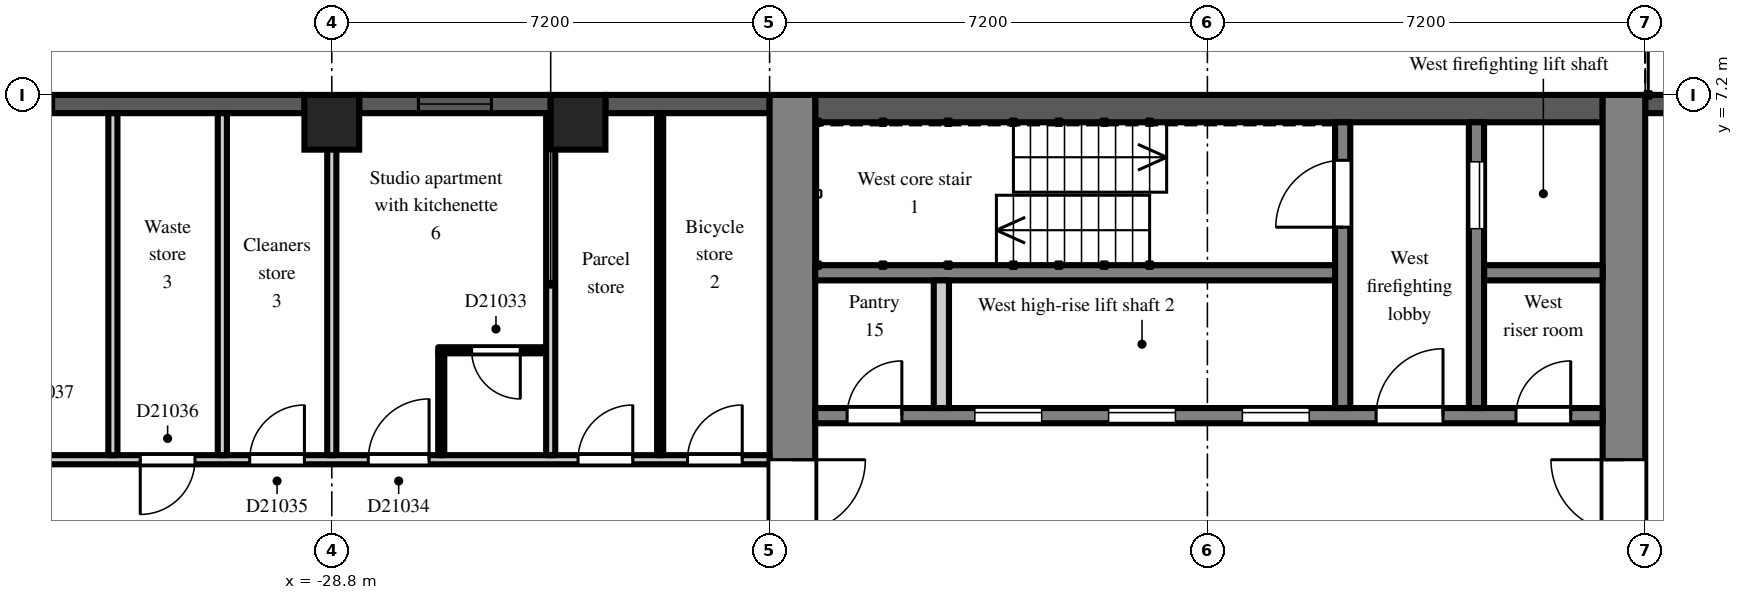
"""IFC4 building model, lengths in metres.
Left out: names, types, materials, properties, quantities, classifications, styles, units other than length and angle.
Written with IfcOpenShell. Run it as: python <this file> out.ifc"""

import sys

from ifc_helpers import new_model, si_unit, direction, frame, frame_2d, origin, origin_2d, place, context, subcontext, project, spatial, rectangle, extrude, element, fill, save


model = new_model("IFC4")
c1 = context("Model", 3, precision=1e-05, world=origin(), true_north=direction((0.0, 1.0)))
c2 = subcontext(c1, "Body", "Model", "MODEL_VIEW")
j1 = project(units=[si_unit("LENGTHUNIT", "METRE"), si_unit("PLANEANGLEUNIT", "RADIAN")], contexts=[c1])
p1 = place(None, origin())
s1 = spatial("IfcSite", under=j1, at=p1, CompositionType="ELEMENT")
p2 = place(p1, origin())
s2 = spatial("IfcBuilding", under=s1, at=p2, CompositionType="ELEMENT")
p3 = place(p2, frame((0.0, 0.0, 147.3)))
s3 = spatial("IfcBuildingStorey", under=s2, at=p3, CompositionType="ELEMENT", Elevation=147.3)
for number, where, z_axis, x_axis in (
    (1, (-28.8, 6.75, 0.0), (0.0, 0.0, 1.0), (1.0, 0.0, 0.0)),
    (2, (-24.75, 6.75, 0.0), (0.0, 0.0, 1.0), (1.0, 0.0, 0.0)),
):
    element("IfcColumn", number, at=place(p3, frame(where, z_axis=z_axis, x_axis=x_axis)), inside=s3, PredefinedType="COLUMN", context=c2, shape_type="SweptSolid", body=[
        extrude(rectangle(XDim=0.9, YDim=0.9, at=origin_2d()), origin(), (0.0, 0.0, 1.0), 3.0),
    ])
p4 = place(p3, frame((-4.2, 7.05, 0.0), z_axis=(0.0, 0.0, 1.0), x_axis=(-1.0, 0.0, 0.0)))
e3 = element("IfcWall", 3, at=p4, inside=s3, PredefinedType="SOLIDWALL", context=c2, shape_type="SweptSolid", body=[
    extrude(rectangle(XDim=3.0, YDim=0.3, at=frame_2d((1.5, 0.0))), origin(), (0.0, 0.0, 1.0), 2.2),
])
p5 = place(p3, frame((-21.6, 7.05, 0.0), z_axis=(0.0, 0.0, 1.0), x_axis=(-1.0, 0.0, 0.0)))
e4 = element("IfcWall", 4, at=p5, inside=s3, PredefinedType="SOLIDWALL", context=c2, shape_type="SweptSolid", body=[
    extrude(rectangle(XDim=2.7, YDim=0.3, at=frame_2d((1.35, 0.0))), origin(), (0.0, 0.0, 1.0), 2.2),
])
p6 = place(p3, frame((-25.2, 7.05, 0.0), z_axis=(0.0, 0.0, 1.0), x_axis=(-1.0, 0.0, 0.0)))
e5 = element("IfcWall", 5, at=p6, inside=s3, PredefinedType="SOLIDWALL", context=c2, shape_type="SweptSolid", body=[
    extrude(rectangle(XDim=3.15, YDim=0.3, at=frame_2d((1.575, 0.0))), origin(), (0.0, 0.0, 1.0), 2.2),
])
p7 = place(p6, frame((0.975, 0.0, 0.2)))
e6 = element("IfcOpeningElement", 6, at=p7, cuts=e5, PredefinedType="OPENING", context=c2, shape_type="SweptSolid", body=[
    extrude(rectangle(XDim=1.2, YDim=1.85, at=frame_2d((0.6, 0.925))), frame((0.0, 0.16, 0.0), z_axis=(0.0, -1.0, 0.0), x_axis=(1.0, 0.0, 0.0)), (0.0, 0.0, 1.0), 0.32),
])
p8 = place(p3, frame((-29.25, 7.05, 0.0), z_axis=(0.0, 0.0, 1.0), x_axis=(-1.0, 0.0, 0.0)))
e7 = element("IfcWall", 7, at=p8, inside=s3, PredefinedType="SOLIDWALL", context=c2, shape_type="SweptSolid", body=[
    extrude(rectangle(XDim=6.3, YDim=0.3, at=frame_2d((3.15, 0.0))), origin(), (0.0, 0.0, 1.0), 2.2),
])
p9 = place(p8, frame((4.125, 0.0, 0.2)))
e8 = element("IfcOpeningElement", 8, at=p9, cuts=e7, PredefinedType="OPENING", context=c2, shape_type="SweptSolid", body=[
    extrude(rectangle(XDim=1.2, YDim=1.85, at=frame_2d((0.6, 0.925))), frame((0.0, 0.16, 0.0), z_axis=(0.0, -1.0, 0.0), x_axis=(1.0, 0.0, 0.0)), (0.0, 0.0, 1.0), 0.32),
])
p10 = place(p3, frame((-7.55, -7.2, 0.0), z_axis=(0.0, 0.0, 1.0), x_axis=(0.0, 1.0, 0.0)))
e9 = element("IfcWall", 9, at=p10, inside=s3, PredefinedType="SHEAR", context=c2, shape_type="SweptSolid", body=[
    extrude(rectangle(XDim=14.4, YDim=0.7, at=frame_2d((7.2, 0.0))), origin(), (0.0, 0.0, 1.0), 2.6),
])
p11 = place(p10, frame((6.0, 0.0, 0.0)))
e10 = element("IfcOpeningElement", 10, at=p11, cuts=e9, PredefinedType="OPENING", context=c2, shape_type="SweptSolid", body=[
    extrude(rectangle(XDim=2.4, YDim=2.2, at=frame_2d((1.2, 1.1))), frame((0.0, 0.36, 0.0), z_axis=(0.0, -1.0, 0.0), x_axis=(1.0, 0.0, 0.0)), (0.0, 0.0, 1.0), 0.72),
])
p12 = place(p3, frame((-21.225, -7.2, 0.0), z_axis=(0.0, 0.0, 1.0), x_axis=(0.0, 1.0, 0.0)))
e11 = element("IfcWall", 11, at=p12, inside=s3, PredefinedType="SHEAR", context=c2, shape_type="SweptSolid", body=[
    extrude(rectangle(XDim=14.4, YDim=0.75, at=frame_2d((7.2, 0.0))), origin(), (0.0, 0.0, 1.0), 2.6),
])
p13 = place(p12, frame((6.0, 0.0, 0.0)))
e12 = element("IfcOpeningElement", 12, at=p13, cuts=e11, PredefinedType="OPENING", context=c2, shape_type="SweptSolid", body=[
    extrude(rectangle(XDim=2.4, YDim=2.2, at=frame_2d((1.2, 1.1))), frame((0.0, 0.385, 0.0), z_axis=(0.0, -1.0, 0.0), x_axis=(1.0, 0.0, 0.0)), (0.0, 0.0, 1.0), 0.77),
])
p14 = place(p3, frame((-7.9, 6.975, 0.0), z_axis=(0.0, 0.0, 1.0), x_axis=(-1.0, 0.0, 0.0)))
e13 = element("IfcWall", 13, at=p14, inside=s3, PredefinedType="SHEAR", context=c2, shape_type="SweptSolid", body=[
    extrude(rectangle(XDim=12.95, YDim=0.45, at=frame_2d((6.475, 0.0))), origin(), (0.0, 0.0, 1.0), 2.6),
])
p15 = place(p3, frame((-7.9, 1.925, 0.0), z_axis=(0.0, 0.0, 1.0), x_axis=(-1.0, 0.0, 0.0)))
e14 = element("IfcWall", 14, at=p15, inside=s3, PredefinedType="SHEAR", context=c2, shape_type="SweptSolid", body=[
    extrude(rectangle(XDim=12.95, YDim=0.25, at=frame_2d((6.475, 0.0))), origin(), (0.0, 0.0, 1.0), 2.6),
])
p16 = place(p15, frame((4.825, 0.0, 0.0)))
e15 = element("IfcOpeningElement", 15, at=p16, cuts=e14, PredefinedType="OPENING", context=c2, shape_type="SweptSolid", body=[
    extrude(rectangle(XDim=1.1, YDim=2.1, at=frame_2d((0.55, 1.05))), frame((0.0, 0.135, 0.0), z_axis=(0.0, -1.0, 0.0), x_axis=(1.0, 0.0, 0.0)), (0.0, 0.0, 1.0), 0.27),
])
p17 = place(p15, frame((7.025, 0.0, 0.0)))
e16 = element("IfcOpeningElement", 16, at=p17, cuts=e14, PredefinedType="OPENING", context=c2, shape_type="SweptSolid", body=[
    extrude(rectangle(XDim=1.1, YDim=2.1, at=frame_2d((0.55, 1.05))), frame((0.0, 0.135, 0.0), z_axis=(0.0, -1.0, 0.0), x_axis=(1.0, 0.0, 0.0)), (0.0, 0.0, 1.0), 0.27),
])
p18 = place(p15, frame((9.225, 0.0, 0.0)))
e17 = element("IfcOpeningElement", 17, at=p18, cuts=e14, PredefinedType="OPENING", context=c2, shape_type="SweptSolid", body=[
    extrude(rectangle(XDim=1.1, YDim=2.1, at=frame_2d((0.55, 1.05))), frame((0.0, 0.135, 0.0), z_axis=(0.0, -1.0, 0.0), x_axis=(1.0, 0.0, 0.0)), (0.0, 0.0, 1.0), 0.27),
])
p19 = place(p15, frame((0.525, 0.0, 0.0)))
e18 = element("IfcOpeningElement", 18, at=p19, cuts=e14, PredefinedType="OPENING", context=c2, shape_type="SweptSolid", body=[
    extrude(rectangle(XDim=0.9, YDim=2.1, at=frame_2d((0.45, 1.05))), frame((0.0, 0.135, 0.0), z_axis=(0.0, -1.0, 0.0), x_axis=(1.0, 0.0, 0.0)), (0.0, 0.0, 1.0), 0.27),
])
p20 = place(p15, frame((2.625, 0.0, 0.0)))
e19 = element("IfcOpeningElement", 19, at=p20, cuts=e14, PredefinedType="OPENING", context=c2, shape_type="SweptSolid", body=[
    extrude(rectangle(XDim=1.1, YDim=2.1, at=frame_2d((0.55, 1.05))), frame((0.0, 0.135, 0.0), z_axis=(0.0, -1.0, 0.0), x_axis=(1.0, 0.0, 0.0)), (0.0, 0.0, 1.0), 0.27),
])
p21 = place(p15, frame((11.525, 0.0, 0.0)))
e20 = element("IfcOpeningElement", 20, at=p21, cuts=e14, PredefinedType="OPENING", context=c2, shape_type="SweptSolid", body=[
    extrude(rectangle(XDim=0.9, YDim=2.1, at=frame_2d((0.45, 1.05))), frame((0.0, 0.135, 0.0), z_axis=(0.0, -1.0, 0.0), x_axis=(1.0, 0.0, 0.0)), (0.0, 0.0, 1.0), 0.27),
])
p22 = place(p3, frame((-7.9, 4.275, 0.0), z_axis=(0.0, 0.0, 1.0), x_axis=(-1.0, 0.0, 0.0)))
e21 = element("IfcWall", 21, at=p22, inside=s3, PredefinedType="SHEAR", context=c2, shape_type="SweptSolid", body=[
    extrude(rectangle(XDim=1.95, YDim=0.25, at=frame_2d((0.975, 0.0))), origin(), (0.0, 0.0, 1.0), 2.6),
])
p23 = place(p3, frame((-12.3, 4.275, 0.0), z_axis=(0.0, 0.0, 1.0), x_axis=(-1.0, 0.0, 0.0)))
e22 = element("IfcWall", 22, at=p23, inside=s3, PredefinedType="SHEAR", context=c2, shape_type="SweptSolid", body=[
    extrude(rectangle(XDim=8.55, YDim=0.25, at=frame_2d((4.275, 0.0))), origin(), (0.0, 0.0, 1.0), 2.6),
])
p24 = place(p3, frame((-9.975, 2.05, 0.0), z_axis=(0.0, 0.0, 1.0), x_axis=(0.0, 1.0, 0.0)))
e23 = element("IfcWall", 23, at=p24, inside=s3, PredefinedType="SHEAR", context=c2, shape_type="SweptSolid", body=[
    extrude(rectangle(XDim=4.7, YDim=0.25, at=frame_2d((2.35, 0.0))), origin(), (0.0, 0.0, 1.0), 2.6),
])
p25 = place(p24, frame((2.95, 0.0, 0.0)))
e24 = element("IfcOpeningElement", 24, at=p25, cuts=e23, PredefinedType="OPENING", context=c2, shape_type="SweptSolid", body=[
    extrude(rectangle(XDim=1.1, YDim=2.1, at=frame_2d((0.55, 1.05))), frame((0.0, 0.135, 0.0), z_axis=(0.0, -1.0, 0.0), x_axis=(1.0, 0.0, 0.0)), (0.0, 0.0, 1.0), 0.27),
])
p26 = place(p3, frame((-12.175, 2.05, 0.0), z_axis=(0.0, 0.0, 1.0), x_axis=(0.0, 1.0, 0.0)))
e25 = element("IfcWall", 25, at=p26, inside=s3, PredefinedType="SHEAR", context=c2, shape_type="SweptSolid", body=[
    extrude(rectangle(XDim=4.7, YDim=0.25, at=frame_2d((2.35, 0.0))), origin(), (0.0, 0.0, 1.0), 2.6),
])
p27 = place(p26, frame((2.975, 0.0, 0.0)))
e26 = element("IfcOpeningElement", 26, at=p27, cuts=e25, PredefinedType="OPENING", context=c2, shape_type="SweptSolid", body=[
    extrude(rectangle(XDim=1.1, YDim=2.1, at=frame_2d((0.55, 1.05))), frame((0.0, 0.135, 0.0), z_axis=(0.0, -1.0, 0.0), x_axis=(1.0, 0.0, 0.0)), (0.0, 0.0, 1.0), 0.27),
])
p28 = place(p3, frame((-18.775, 2.05, 0.0), z_axis=(0.0, 0.0, 1.0), x_axis=(0.0, 1.0, 0.0)))
e27 = element("IfcWall", 27, at=p28, inside=s3, PredefinedType="PARTITIONING", context=c2, shape_type="SweptSolid", body=[
    extrude(rectangle(XDim=2.1, YDim=0.25, at=frame_2d((1.05, 0.0))), origin(), (0.0, 0.0, 1.0), 2.6),
])
p29 = place(p3, frame((-36.5, 1.2, 0.0), z_axis=(0.0, 0.0, 1.0), x_axis=(1.0, 0.0, 0.0)))
e28 = element("IfcWall", 28, at=p29, inside=s3, PredefinedType="PARTITIONING", context=c2, shape_type="SweptSolid", body=[
    extrude(rectangle(XDim=14.9, YDim=0.15, at=frame_2d((7.45, 0.0))), origin(), (0.0, 0.0, 1.0), 2.6),
])
p30 = place(p29, frame((13.55, 0.0, 0.0)))
e29 = element("IfcOpeningElement", 29, at=p30, cuts=e28, PredefinedType="OPENING", context=c2, shape_type="SweptSolid", body=[
    extrude(rectangle(XDim=0.9, YDim=2.1, at=frame_2d((0.45, 1.05))), frame((0.0, 0.085, 0.0), z_axis=(0.0, -1.0, 0.0), x_axis=(1.0, 0.0, 0.0)), (0.0, 0.0, 1.0), 0.17),
])
p31 = place(p29, frame((11.75, 0.0, 0.0)))
e30 = element("IfcOpeningElement", 30, at=p31, cuts=e28, PredefinedType="OPENING", context=c2, shape_type="SweptSolid", body=[
    extrude(rectangle(XDim=0.9, YDim=2.1, at=frame_2d((0.45, 1.05))), frame((0.0, 0.085, 0.0), z_axis=(0.0, -1.0, 0.0), x_axis=(1.0, 0.0, 0.0)), (0.0, 0.0, 1.0), 0.17),
])
p32 = place(p29, frame((8.3, 0.0, 0.0)))
e31 = element("IfcOpeningElement", 31, at=p32, cuts=e28, PredefinedType="OPENING", context=c2, shape_type="SweptSolid", body=[
    extrude(rectangle(XDim=1.0, YDim=2.1, at=frame_2d((0.5, 1.05))), frame((0.0, 0.085, 0.0), z_axis=(0.0, -1.0, 0.0), x_axis=(1.0, 0.0, 0.0)), (0.0, 0.0, 1.0), 0.17),
])
p33 = place(p29, frame((6.35, 0.0, 0.0)))
e32 = element("IfcOpeningElement", 32, at=p33, cuts=e28, PredefinedType="OPENING", context=c2, shape_type="SweptSolid", body=[
    extrude(rectangle(XDim=0.9, YDim=2.1, at=frame_2d((0.45, 1.05))), frame((0.0, 0.085, 0.0), z_axis=(0.0, -1.0, 0.0), x_axis=(1.0, 0.0, 0.0)), (0.0, 0.0, 1.0), 0.17),
])
p34 = place(p29, frame((4.55, 0.0, 0.0)))
e33 = element("IfcOpeningElement", 33, at=p34, cuts=e28, PredefinedType="OPENING", context=c2, shape_type="SweptSolid", body=[
    extrude(rectangle(XDim=0.9, YDim=2.1, at=frame_2d((0.45, 1.05))), frame((0.0, 0.085, 0.0), z_axis=(0.0, -1.0, 0.0), x_axis=(1.0, 0.0, 0.0)), (0.0, 0.0, 1.0), 0.17),
])
p35 = place(p29, frame((1.15, 0.0, 0.0)))
e34 = element("IfcOpeningElement", 34, at=p35, cuts=e28, PredefinedType="OPENING", context=c2, shape_type="SweptSolid", body=[
    extrude(rectangle(XDim=1.8, YDim=2.1, at=frame_2d((0.9, 1.05))), frame((0.0, 0.085, 0.0), z_axis=(0.0, -1.0, 0.0), x_axis=(1.0, 0.0, 0.0)), (0.0, 0.0, 1.0), 0.17),
])
for number, where, z_axis, x_axis in (
    (35, (-32.4, 1.275, 0.0), (0.0, 0.0, 1.0), (0.0, 1.0, 0.0)),
    (36, (-30.6, 1.275, 0.0), (0.0, 0.0, 1.0), (0.0, 1.0, 0.0)),
    (37, (-28.8, 1.275, 0.0), (0.0, 0.0, 1.0), (0.0, 1.0, 0.0)),
):
    element("IfcWall", number, at=place(p3, frame(where, z_axis=z_axis, x_axis=x_axis)), inside=s3, PredefinedType="PARTITIONING", context=c2, shape_type="SweptSolid", body=[
        extrude(rectangle(XDim=5.625, YDim=0.15, at=frame_2d((2.812, 0.0))), origin(), (0.0, 0.0, 1.0), 2.6),
    ])
p36 = place(p3, frame((-27.0, 1.275, 0.0), z_axis=(0.0, 0.0, 1.0), x_axis=(0.0, 1.0, 0.0)))
e38 = element("IfcWall", 38, at=p36, inside=s3, PredefinedType="PARTITIONING", context=c2, shape_type="SweptSolid", body=[
    extrude(rectangle(XDim=1.675, YDim=0.1, at=frame_2d((0.837, 0.0))), origin(), (0.0, 0.0, 1.0), 2.6),
])
p37 = place(p3, frame((-27.05, 3.0, 0.0), z_axis=(0.0, 0.0, 1.0), x_axis=(1.0, 0.0, 0.0)))
e39 = element("IfcWall", 39, at=p37, inside=s3, PredefinedType="PARTITIONING", context=c2, shape_type="SweptSolid", body=[
    extrude(rectangle(XDim=1.775, YDim=0.1, at=frame_2d((0.888, 0.0))), origin(), (0.0, 0.0, 1.0), 2.6),
])
p38 = place(p37, frame((0.55, 0.0, 0.0)))
e40 = element("IfcOpeningElement", 40, at=p38, cuts=e39, PredefinedType="OPENING", context=c2, shape_type="SweptSolid", body=[
    extrude(rectangle(XDim=0.8, YDim=2.1, at=frame_2d((0.4, 1.05))), frame((0.0, 0.06, 0.0), z_axis=(0.0, -1.0, 0.0), x_axis=(1.0, 0.0, 0.0)), (0.0, 0.0, 1.0), 0.12),
])
p39 = place(p3, frame((-25.2, 1.275, 0.0), z_axis=(0.0, 0.0, 1.0), x_axis=(0.0, 1.0, 0.0)))
e41 = element("IfcWall", 41, at=p39, inside=s3, PredefinedType="PARTITIONING", context=c2, shape_type="SweptSolid", body=[
    extrude(rectangle(XDim=5.625, YDim=0.15, at=frame_2d((2.812, 0.0))), origin(), (0.0, 0.0, 1.0), 2.6),
])
p40 = place(p3, frame((-23.4, 1.275, 0.0), z_axis=(0.0, 0.0, 1.0), x_axis=(0.0, 1.0, 0.0)))
e42 = element("IfcWall", 42, at=p40, inside=s3, PredefinedType="PARTITIONING", context=c2, shape_type="SweptSolid", body=[
    extrude(rectangle(XDim=5.625, YDim=0.1, at=frame_2d((2.812, 0.0))), origin(), (0.0, 0.0, 1.0), 2.6),
])
p41 = place(p7, origin())
e43 = element("IfcWindow", 43, at=p41, inside=s3, PartitioningType="SINGLE_PANEL", PredefinedType="WINDOW", context=c2, shape_type="SweptSolid", body=[
    extrude(rectangle(XDim=1.2, YDim=1.85, at=frame_2d((0.6, 0.925))), frame((0.0, 0.03, 0.0), z_axis=(0.0, -1.0, 0.0), x_axis=(1.0, 0.0, 0.0)), (0.0, 0.0, 1.0), 0.06),
])
fill(e6, e43)
p42 = place(p9, origin())
e44 = element("IfcWindow", 44, at=p42, inside=s3, PartitioningType="SINGLE_PANEL", PredefinedType="WINDOW", context=c2, shape_type="SweptSolid", body=[
    extrude(rectangle(XDim=1.2, YDim=1.85, at=frame_2d((0.6, 0.925))), frame((0.0, 0.03, 0.0), z_axis=(0.0, -1.0, 0.0), x_axis=(1.0, 0.0, 0.0)), (0.0, 0.0, 1.0), 0.06),
])
fill(e8, e44)
p43 = place(p16, origin())
e45 = element("IfcDoor", 45, at=p43, inside=s3, OperationType="SLIDING_TO_LEFT", PredefinedType="DOOR", context=c2, shape_type="SweptSolid", body=[
    extrude(rectangle(XDim=1.1, YDim=2.1, at=frame_2d((0.55, 1.05))), frame((0.0, 0.025, 0.0), z_axis=(0.0, -1.0, 0.0), x_axis=(1.0, 0.0, 0.0)), (0.0, 0.0, 1.0), 0.05),
])
fill(e15, e45)
p44 = place(p17, origin())
e46 = element("IfcDoor", 46, at=p44, inside=s3, OperationType="SLIDING_TO_LEFT", PredefinedType="DOOR", context=c2, shape_type="SweptSolid", body=[
    extrude(rectangle(XDim=1.1, YDim=2.1, at=frame_2d((0.55, 1.05))), frame((0.0, 0.025, 0.0), z_axis=(0.0, -1.0, 0.0), x_axis=(1.0, 0.0, 0.0)), (0.0, 0.0, 1.0), 0.05),
])
fill(e16, e46)
p45 = place(p18, origin())
e47 = element("IfcDoor", 47, at=p45, inside=s3, OperationType="SLIDING_TO_LEFT", PredefinedType="DOOR", context=c2, shape_type="SweptSolid", body=[
    extrude(rectangle(XDim=1.1, YDim=2.1, at=frame_2d((0.55, 1.05))), frame((0.0, 0.025, 0.0), z_axis=(0.0, -1.0, 0.0), x_axis=(1.0, 0.0, 0.0)), (0.0, 0.0, 1.0), 0.05),
])
fill(e17, e47)
p46 = place(p25, origin())
e48 = element("IfcDoor", 48, at=p46, inside=s3, OperationType="SLIDING_TO_LEFT", PredefinedType="DOOR", context=c2, shape_type="SweptSolid", body=[
    extrude(rectangle(XDim=1.1, YDim=2.1, at=frame_2d((0.55, 1.05))), frame((0.0, 0.025, 0.0), z_axis=(0.0, -1.0, 0.0), x_axis=(1.0, 0.0, 0.0)), (0.0, 0.0, 1.0), 0.05),
])
fill(e24, e48)
p47 = place(p27, origin())
e49 = element("IfcDoor", 49, at=p47, inside=s3, OperationType="SINGLE_SWING_LEFT", PredefinedType="DOOR", context=c2, shape_type="SweptSolid", body=[
    extrude(rectangle(XDim=1.1, YDim=2.1, at=frame_2d((0.55, 1.05))), frame((0.0, 0.025, 0.0), z_axis=(0.0, -1.0, 0.0), x_axis=(1.0, 0.0, 0.0)), (0.0, 0.0, 1.0), 0.05),
])
fill(e26, e49)
p48 = place(p19, frame((0.9, 0.0, 0.0), z_axis=(0.0, 0.0, 1.0), x_axis=(-1.0, 0.0, 0.0)))
e50 = element("IfcDoor", 50, at=p48, inside=s3, OperationType="SINGLE_SWING_RIGHT", PredefinedType="DOOR", context=c2, shape_type="SweptSolid", body=[
    extrude(rectangle(XDim=0.9, YDim=2.1, at=frame_2d((0.45, 1.05))), frame((0.0, 0.025, 0.0), z_axis=(0.0, -1.0, 0.0), x_axis=(1.0, 0.0, 0.0)), (0.0, 0.0, 1.0), 0.05),
])
fill(e18, e50)
p49 = place(p20, frame((1.1, 0.0, 0.0), z_axis=(0.0, 0.0, 1.0), x_axis=(-1.0, 0.0, 0.0)))
e51 = element("IfcDoor", 51, at=p49, inside=s3, OperationType="SINGLE_SWING_RIGHT", PredefinedType="DOOR", context=c2, shape_type="SweptSolid", body=[
    extrude(rectangle(XDim=1.1, YDim=2.1, at=frame_2d((0.55, 1.05))), frame((0.0, 0.025, 0.0), z_axis=(0.0, -1.0, 0.0), x_axis=(1.0, 0.0, 0.0)), (0.0, 0.0, 1.0), 0.05),
])
fill(e19, e51)
p50 = place(p11, origin())
e52 = element("IfcDoor", 52, at=p50, inside=s3, OperationType="DOUBLE_DOOR_DOUBLE_SWING", PredefinedType="DOOR", context=c2, shape_type="SweptSolid", body=[
    extrude(rectangle(XDim=2.4, YDim=2.2, at=frame_2d((1.2, 1.1))), frame((0.0, 0.025, 0.0), z_axis=(0.0, -1.0, 0.0), x_axis=(1.0, 0.0, 0.0)), (0.0, 0.0, 1.0), 0.05),
])
fill(e10, e52)
p51 = place(p13, frame((2.4, 0.0, 0.0), z_axis=(0.0, 0.0, 1.0), x_axis=(-1.0, 0.0, 0.0)))
e53 = element("IfcDoor", 53, at=p51, inside=s3, OperationType="DOUBLE_DOOR_DOUBLE_SWING", PredefinedType="DOOR", context=c2, shape_type="SweptSolid", body=[
    extrude(rectangle(XDim=2.4, YDim=2.2, at=frame_2d((1.2, 1.1))), frame((0.0, 0.025, 0.0), z_axis=(0.0, -1.0, 0.0), x_axis=(1.0, 0.0, 0.0)), (0.0, 0.0, 1.0), 0.05),
])
fill(e12, e53)
p52 = place(p21, frame((0.9, 0.0, 0.0), z_axis=(0.0, 0.0, 1.0), x_axis=(-1.0, 0.0, 0.0)))
e54 = element("IfcDoor", 54, at=p52, inside=s3, OperationType="SINGLE_SWING_RIGHT", PredefinedType="DOOR", context=c2, shape_type="SweptSolid", body=[
    extrude(rectangle(XDim=0.9, YDim=2.1, at=frame_2d((0.45, 1.05))), frame((0.0, 0.025, 0.0), z_axis=(0.0, -1.0, 0.0), x_axis=(1.0, 0.0, 0.0)), (0.0, 0.0, 1.0), 0.05),
])
fill(e20, e54)
p53 = place(p30, origin())
e55 = element("IfcDoor", 55, at=p53, inside=s3, OperationType="SINGLE_SWING_RIGHT", PredefinedType="DOOR", context=c2, shape_type="SweptSolid", body=[
    extrude(rectangle(XDim=0.9, YDim=2.1, at=frame_2d((0.45, 1.05))), frame((0.0, 0.025, 0.0), z_axis=(0.0, -1.0, 0.0), x_axis=(1.0, 0.0, 0.0)), (0.0, 0.0, 1.0), 0.05),
])
fill(e29, e55)
p54 = place(p31, origin())
e56 = element("IfcDoor", 56, at=p54, inside=s3, OperationType="SINGLE_SWING_RIGHT", PredefinedType="DOOR", context=c2, shape_type="SweptSolid", body=[
    extrude(rectangle(XDim=0.9, YDim=2.1, at=frame_2d((0.45, 1.05))), frame((0.0, 0.025, 0.0), z_axis=(0.0, -1.0, 0.0), x_axis=(1.0, 0.0, 0.0)), (0.0, 0.0, 1.0), 0.05),
])
fill(e30, e56)
p55 = place(p38, frame((0.8, 0.0, 0.0), z_axis=(0.0, 0.0, 1.0), x_axis=(-1.0, 0.0, 0.0)))
e57 = element("IfcDoor", 57, at=p55, inside=s3, OperationType="SINGLE_SWING_LEFT", PredefinedType="DOOR", context=c2, shape_type="SweptSolid", body=[
    extrude(rectangle(XDim=0.8, YDim=2.1, at=frame_2d((0.4, 1.05))), frame((0.0, 0.025, 0.0), z_axis=(0.0, -1.0, 0.0), x_axis=(1.0, 0.0, 0.0)), (0.0, 0.0, 1.0), 0.05),
])
fill(e40, e57)
p56 = place(p32, origin())
e58 = element("IfcDoor", 58, at=p56, inside=s3, OperationType="SINGLE_SWING_RIGHT", PredefinedType="DOOR", context=c2, shape_type="SweptSolid", body=[
    extrude(rectangle(XDim=1.0, YDim=2.1, at=frame_2d((0.5, 1.05))), frame((0.0, 0.025, 0.0), z_axis=(0.0, -1.0, 0.0), x_axis=(1.0, 0.0, 0.0)), (0.0, 0.0, 1.0), 0.05),
])
fill(e31, e58)
p57 = place(p33, origin())
e59 = element("IfcDoor", 59, at=p57, inside=s3, OperationType="SINGLE_SWING_RIGHT", PredefinedType="DOOR", context=c2, shape_type="SweptSolid", body=[
    extrude(rectangle(XDim=0.9, YDim=2.1, at=frame_2d((0.45, 1.05))), frame((0.0, 0.025, 0.0), z_axis=(0.0, -1.0, 0.0), x_axis=(1.0, 0.0, 0.0)), (0.0, 0.0, 1.0), 0.05),
])
fill(e32, e59)
p58 = place(p34, frame((0.9, 0.0, 0.0), z_axis=(0.0, 0.0, 1.0), x_axis=(-1.0, 0.0, 0.0)))
e60 = element("IfcDoor", 60, at=p58, inside=s3, OperationType="SINGLE_SWING_RIGHT", PredefinedType="DOOR", context=c2, shape_type="SweptSolid", body=[
    extrude(rectangle(XDim=0.9, YDim=2.1, at=frame_2d((0.45, 1.05))), frame((0.0, 0.025, 0.0), z_axis=(0.0, -1.0, 0.0), x_axis=(1.0, 0.0, 0.0)), (0.0, 0.0, 1.0), 0.05),
])
fill(e33, e60)
save(model, sys.argv[1])
